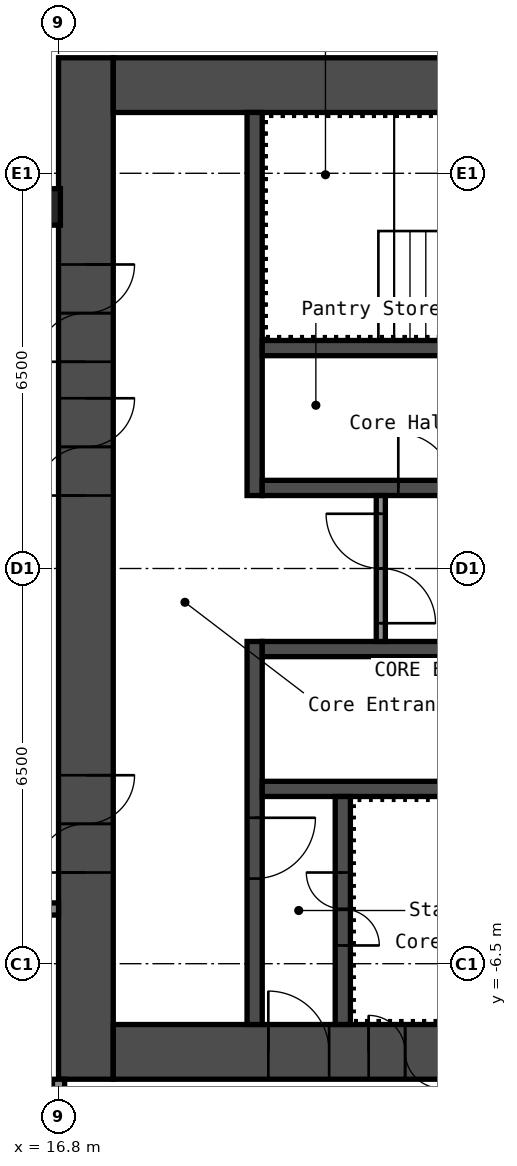
"""IFC4 building model, lengths in metres.
Left out: names, types, materials, properties, quantities, classifications, styles, units other than length and angle.
Written with IfcOpenShell. Run it as: python <this file> out.ifc"""

import sys

from ifc_helpers import new_model, si_unit, direction, frame, frame_2d, origin, origin_2d, place, context, subcontext, project, spatial, rectangle, hollow_rectangle, extrude, element, fill, save


model = new_model("IFC4")
c1 = context("Model", 3, precision=1e-05, world=origin(), true_north=direction((0.0, 1.0)))
c2 = subcontext(c1, "Body", "Model", "MODEL_VIEW")
j1 = project(units=[si_unit("LENGTHUNIT", "METRE"), si_unit("PLANEANGLEUNIT", "RADIAN")], contexts=[c1])
p1 = place(None, origin())
s1 = spatial("IfcSite", under=j1, at=p1, CompositionType="ELEMENT")
p2 = place(p1, origin())
s2 = spatial("IfcBuilding", under=s1, at=p2, CompositionType="ELEMENT")
p3 = place(p2, frame((0.0, 0.0, 264.6)))
s3 = spatial("IfcBuildingStorey", under=s2, at=p3, CompositionType="ELEMENT", Elevation=264.6)
p4 = place(p3, frame((16.53, 5.947, 0.0), z_axis=(0.0, 0.0, 1.0), x_axis=(1.0, 0.0, 0.0)))
e1 = element("IfcColumn", 1, at=p4, inside=s3, PredefinedType="COLUMN", context=c2, shape_type="SweptSolid", body=[
    extrude(hollow_rectangle(XDim=0.6, YDim=0.6, WallThickness=0.025, InnerFilletRadius=0.038, OuterFilletRadius=0.062, at=origin_2d()), origin(), (0.0, 0.0, 1.0), 5.55),
])
p5 = place(p3, frame((17.25, -8.4, 0.0), z_axis=(0.0, 0.0, 1.0), x_axis=(0.0, 1.0, 0.0)))
e2 = element("IfcWall", 2, at=p5, inside=s3, PredefinedType="SHEAR", context=c2, shape_type="SweptSolid", body=[
    extrude(rectangle(XDim=16.8, YDim=0.9, at=frame_2d((8.4, 0.0))), origin(), (0.0, 0.0, 1.0), 5.55),
])
p6 = place(p5, frame((3.4, 0.0, 0.0)))
e3 = element("IfcOpeningElement", 3, at=p6, cuts=e2, PredefinedType="OPENING", context=c2, shape_type="SweptSolid", body=[
    extrude(rectangle(XDim=1.6, YDim=2.1, at=frame_2d((0.8, 1.05))), frame((0.0, 0.46, 0.0), z_axis=(0.0, -1.0, 0.0), x_axis=(1.0, 0.0, 0.0)), (0.0, 0.0, 1.0), 0.92),
])
p7 = place(p5, frame((9.6, 0.0, 0.0)))
e4 = element("IfcOpeningElement", 4, at=p7, cuts=e2, PredefinedType="OPENING", context=c2, shape_type="SweptSolid", body=[
    extrude(rectangle(XDim=1.6, YDim=2.1, at=frame_2d((0.8, 1.05))), frame((0.0, 0.46, 0.0), z_axis=(0.0, -1.0, 0.0), x_axis=(1.0, 0.0, 0.0)), (0.0, 0.0, 1.0), 0.92),
])
p8 = place(p5, frame((11.8, 0.0, 0.0)))
e5 = element("IfcOpeningElement", 5, at=p8, cuts=e2, PredefinedType="OPENING", context=c2, shape_type="SweptSolid", body=[
    extrude(rectangle(XDim=1.6, YDim=2.1, at=frame_2d((0.8, 1.05))), frame((0.0, 0.46, 0.0), z_axis=(0.0, -1.0, 0.0), x_axis=(1.0, 0.0, 0.0)), (0.0, 0.0, 1.0), 0.92),
])
p9 = place(p3, frame((17.7, 7.95, 0.0), z_axis=(0.0, 0.0, 1.0), x_axis=(1.0, 0.0, 0.0)))
e6 = element("IfcWall", 6, at=p9, inside=s3, PredefinedType="SHEAR", context=c2, shape_type="SweptSolid", body=[
    extrude(rectangle(XDim=15.0, YDim=0.9, at=frame_2d((7.5, 0.0))), origin(), (0.0, 0.0, 1.0), 5.55),
])
p10 = place(p9, frame((10.4, 0.0, 0.0)))
e7 = element("IfcOpeningElement", 7, at=p10, cuts=e6, PredefinedType="OPENING", context=c2, shape_type="SweptSolid", body=[
    extrude(rectangle(XDim=1.2, YDim=2.1, at=frame_2d((0.6, 1.05))), frame((0.0, 0.46, 0.0), z_axis=(0.0, -1.0, 0.0), x_axis=(1.0, 0.0, 0.0)), (0.0, 0.0, 1.0), 0.92),
])
p11 = place(p9, frame((13.35, 0.0, 0.0)))
e8 = element("IfcOpeningElement", 8, at=p11, cuts=e6, PredefinedType="OPENING", context=c2, shape_type="SweptSolid", body=[
    extrude(rectangle(XDim=0.9, YDim=2.1, at=frame_2d((0.45, 1.05))), frame((0.0, 0.46, 0.0), z_axis=(0.0, -1.0, 0.0), x_axis=(1.0, 0.0, 0.0)), (0.0, 0.0, 1.0), 0.92),
])
p12 = place(p9, frame((6.75, 0.0, 0.0)))
e9 = element("IfcOpeningElement", 9, at=p12, cuts=e6, PredefinedType="OPENING", context=c2, shape_type="SweptSolid", body=[
    extrude(rectangle(XDim=1.2, YDim=2.1, at=frame_2d((0.6, 1.05))), frame((0.0, 0.46, 0.0), z_axis=(0.0, -1.0, 0.0), x_axis=(1.0, 0.0, 0.0)), (0.0, 0.0, 1.0), 0.92),
])
p13 = place(p3, frame((17.7, -7.95, 0.0), z_axis=(0.0, 0.0, 1.0), x_axis=(1.0, 0.0, 0.0)))
e10 = element("IfcWall", 10, at=p13, inside=s3, PredefinedType="SHEAR", context=c2, shape_type="SweptSolid", body=[
    extrude(rectangle(XDim=15.0, YDim=0.9, at=frame_2d((7.5, 0.0))), origin(), (0.0, 0.0, 1.0), 5.55),
])
p14 = place(p13, frame((2.55, 0.0, 0.0)))
e11 = element("IfcOpeningElement", 11, at=p14, cuts=e10, PredefinedType="OPENING", context=c2, shape_type="SweptSolid", body=[
    extrude(rectangle(XDim=1.0, YDim=2.1, at=frame_2d((0.5, 1.05))), frame((0.0, 0.46, 0.0), z_axis=(0.0, -1.0, 0.0), x_axis=(1.0, 0.0, 0.0)), (0.0, 0.0, 1.0), 0.92),
])
p15 = place(p13, frame((4.2, 0.0, 0.0)))
e12 = element("IfcOpeningElement", 12, at=p15, cuts=e10, PredefinedType="OPENING", context=c2, shape_type="SweptSolid", body=[
    extrude(rectangle(XDim=1.2, YDim=2.1, at=frame_2d((0.6, 1.05))), frame((0.0, 0.46, 0.0), z_axis=(0.0, -1.0, 0.0), x_axis=(1.0, 0.0, 0.0)), (0.0, 0.0, 1.0), 0.92),
])
p16 = place(p3, frame((20.025, 1.2, 0.0), z_axis=(0.0, 0.0, 1.0), x_axis=(0.0, 1.0, 0.0)))
e13 = element("IfcWall", 13, at=p16, inside=s3, PredefinedType="SHEAR", context=c2, shape_type="SweptSolid", body=[
    extrude(rectangle(XDim=6.3, YDim=0.25, at=frame_2d((3.15, 0.0))), origin(), (0.0, 0.0, 1.0), 5.55),
])
p17 = place(p3, frame((20.025, -7.5, 0.0), z_axis=(0.0, 0.0, 1.0), x_axis=(0.0, 1.0, 0.0)))
e14 = element("IfcWall", 14, at=p17, inside=s3, PredefinedType="SHEAR", context=c2, shape_type="SweptSolid", body=[
    extrude(rectangle(XDim=6.3, YDim=0.25, at=frame_2d((3.15, 0.0))), origin(), (0.0, 0.0, 1.0), 5.55),
])
p18 = place(p17, frame((2.4, 0.0, 0.0)))
e15 = element("IfcOpeningElement", 15, at=p18, cuts=e14, PredefinedType="OPENING", context=c2, shape_type="SweptSolid", body=[
    extrude(rectangle(XDim=1.0, YDim=2.1, at=frame_2d((0.5, 1.05))), frame((0.0, 0.135, 0.0), z_axis=(0.0, -1.0, 0.0), x_axis=(1.0, 0.0, 0.0)), (0.0, 0.0, 1.0), 0.27),
])
p19 = place(p3, frame((20.15, 1.325, 0.0), z_axis=(0.0, 0.0, 1.0), x_axis=(1.0, 0.0, 0.0)))
e16 = element("IfcWall", 16, at=p19, inside=s3, PredefinedType="SHEAR", context=c2, shape_type="SweptSolid", body=[
    extrude(rectangle(XDim=7.5, YDim=0.25, at=frame_2d((3.75, 0.0))), origin(), (0.0, 0.0, 1.0), 5.55),
])
p20 = place(p19, frame((2.238, 0.0, 0.0)))
e17 = element("IfcOpeningElement", 17, at=p20, cuts=e16, PredefinedType="OPENING", context=c2, shape_type="SweptSolid", body=[
    extrude(rectangle(XDim=0.9, YDim=2.1, at=frame_2d((0.45, 1.05))), frame((0.0, 0.135, 0.0), z_axis=(0.0, -1.0, 0.0), x_axis=(1.0, 0.0, 0.0)), (0.0, 0.0, 1.0), 0.27),
])
p21 = place(p19, frame((5.938, 0.0, 0.0)))
e18 = element("IfcOpeningElement", 18, at=p21, cuts=e16, PredefinedType="OPENING", context=c2, shape_type="SweptSolid", body=[
    extrude(rectangle(XDim=0.9, YDim=2.1, at=frame_2d((0.45, 1.05))), frame((0.0, 0.135, 0.0), z_axis=(0.0, -1.0, 0.0), x_axis=(1.0, 0.0, 0.0)), (0.0, 0.0, 1.0), 0.27),
])
for number, where, z_axis, x_axis in (
    (19, (20.15, 3.625, 0.0), (0.0, 0.0, 1.0), (1.0, 0.0, 0.0)),
    (20, (20.15, -1.325, 0.0), (0.0, 0.0, 1.0), (1.0, 0.0, 0.0)),
    (21, (20.15, -3.625, 0.0), (0.0, 0.0, 1.0), (1.0, 0.0, 0.0)),
):
    element("IfcWall", number, at=place(p3, frame(where, z_axis=z_axis, x_axis=x_axis)), inside=s3, PredefinedType="SHEAR", context=c2, shape_type="SweptSolid", body=[
        extrude(rectangle(XDim=7.5, YDim=0.25, at=frame_2d((3.75, 0.0))), origin(), (0.0, 0.0, 1.0), 5.55),
    ])
p22 = place(p3, frame((21.475, -7.5, 0.0), z_axis=(0.0, 0.0, 1.0), x_axis=(0.0, 1.0, 0.0)))
e22 = element("IfcWall", 22, at=p22, inside=s3, PredefinedType="SHEAR", context=c2, shape_type="SweptSolid", body=[
    extrude(rectangle(XDim=3.75, YDim=0.25, at=frame_2d((1.875, 0.0))), origin(), (0.0, 0.0, 1.0), 5.55),
])
p23 = place(p22, frame((1.3, 0.0, 0.0)))
e23 = element("IfcOpeningElement", 23, at=p23, cuts=e22, PredefinedType="OPENING", context=c2, shape_type="SweptSolid", body=[
    extrude(rectangle(XDim=1.2, YDim=2.1, at=frame_2d((0.6, 1.05))), frame((0.0, 0.135, 0.0), z_axis=(0.0, -1.0, 0.0), x_axis=(1.0, 0.0, 0.0)), (0.0, 0.0, 1.0), 0.27),
])
p24 = place(p3, frame((22.1, -1.2, 0.0), z_axis=(0.0, 0.0, 1.0), x_axis=(0.0, 1.0, 0.0)))
e24 = element("IfcWall", 24, at=p24, inside=s3, PredefinedType="PARTITIONING", context=c2, shape_type="SweptSolid", body=[
    extrude(rectangle(XDim=2.4, YDim=0.15, at=frame_2d((1.2, 0.0))), origin(), (0.0, 0.0, 1.0), 5.55),
])
p25 = place(p24, frame((0.3, 0.0, 0.0)))
e25 = element("IfcOpeningElement", 25, at=p25, cuts=e24, PredefinedType="OPENING", context=c2, shape_type="SweptSolid", body=[
    extrude(rectangle(XDim=1.8, YDim=2.1, at=frame_2d((0.9, 1.05))), frame((0.0, 0.085, 0.0), z_axis=(0.0, -1.0, 0.0), x_axis=(1.0, 0.0, 0.0)), (0.0, 0.0, 1.0), 0.17),
])
p26 = place(p3, frame((2.3, -5.6, 0.0), z_axis=(0.0, 0.0, 1.0), x_axis=(1.0, 0.0, 0.0)))
e26 = element("IfcWall", 26, at=p26, inside=s3, PredefinedType="PARTITIONING", context=c2, shape_type="SweptSolid", body=[
    extrude(rectangle(XDim=14.5, YDim=0.2, at=frame_2d((7.25, 0.0))), origin(), (0.0, 0.0, 1.0), 5.55),
])
p27 = place(p26, frame((1.1, 0.0, 0.0)))
e27 = element("IfcOpeningElement", 27, at=p27, cuts=e26, PredefinedType="OPENING", context=c2, shape_type="SweptSolid", body=[
    extrude(rectangle(XDim=1.0, YDim=2.1, at=frame_2d((0.5, 1.05))), frame((0.0, 0.11, 0.0), z_axis=(0.0, -1.0, 0.0), x_axis=(1.0, 0.0, 0.0)), (0.0, 0.0, 1.0), 0.22),
])
p28 = place(p26, frame((5.25, 0.0, 0.0)))
e28 = element("IfcOpeningElement", 28, at=p28, cuts=e26, PredefinedType="OPENING", context=c2, shape_type="SweptSolid", body=[
    extrude(rectangle(XDim=0.9, YDim=2.1, at=frame_2d((0.45, 1.05))), frame((0.0, 0.11, 0.0), z_axis=(0.0, -1.0, 0.0), x_axis=(1.0, 0.0, 0.0)), (0.0, 0.0, 1.0), 0.22),
])
p29 = place(p3, frame((16.8, -10.8, 0.0), z_axis=(0.0, 0.0, 1.0), x_axis=(0.0, 1.0, 0.0)))
e29 = element("IfcWall", 29, at=p29, inside=s3, PredefinedType="PARTITIONING", context=c2, shape_type="SweptSolid", body=[
    extrude(rectangle(XDim=2.4, YDim=0.2, at=frame_2d((1.2, 0.0))), origin(), (0.0, 0.0, 1.0), 5.55),
])
p30 = place(p6, origin())
e30 = element("IfcDoor", 30, at=p30, inside=s3, OperationType="DOUBLE_DOOR_SINGLE_SWING", PredefinedType="DOOR", context=c2, shape_type="SweptSolid", body=[
    extrude(rectangle(XDim=1.6, YDim=2.1, at=frame_2d((0.8, 1.05))), frame((0.0, 0.025, 0.0), z_axis=(0.0, -1.0, 0.0), x_axis=(1.0, 0.0, 0.0)), (0.0, 0.0, 1.0), 0.05),
])
fill(e3, e30)
p31 = place(p7, origin())
e31 = element("IfcDoor", 31, at=p31, inside=s3, OperationType="DOUBLE_DOOR_SINGLE_SWING", PredefinedType="DOOR", context=c2, shape_type="SweptSolid", body=[
    extrude(rectangle(XDim=1.6, YDim=2.1, at=frame_2d((0.8, 1.05))), frame((0.0, 0.025, 0.0), z_axis=(0.0, -1.0, 0.0), x_axis=(1.0, 0.0, 0.0)), (0.0, 0.0, 1.0), 0.05),
])
fill(e4, e31)
p32 = place(p8, origin())
e32 = element("IfcDoor", 32, at=p32, inside=s3, OperationType="DOUBLE_DOOR_SINGLE_SWING", PredefinedType="DOOR", context=c2, shape_type="SweptSolid", body=[
    extrude(rectangle(XDim=1.6, YDim=2.1, at=frame_2d((0.8, 1.05))), frame((0.0, 0.025, 0.0), z_axis=(0.0, -1.0, 0.0), x_axis=(1.0, 0.0, 0.0)), (0.0, 0.0, 1.0), 0.05),
])
fill(e5, e32)
p33 = place(p14, origin())
e33 = element("IfcDoor", 33, at=p33, inside=s3, OperationType="SINGLE_SWING_RIGHT", PredefinedType="DOOR", context=c2, shape_type="SweptSolid", body=[
    extrude(rectangle(XDim=1.0, YDim=2.1, at=frame_2d((0.5, 1.05))), frame((0.0, 0.025, 0.0), z_axis=(0.0, -1.0, 0.0), x_axis=(1.0, 0.0, 0.0)), (0.0, 0.0, 1.0), 0.05),
])
fill(e11, e33)
p34 = place(p15, origin())
e34 = element("IfcDoor", 34, at=p34, inside=s3, OperationType="DOUBLE_DOOR_SINGLE_SWING", PredefinedType="DOOR", context=c2, shape_type="SweptSolid", body=[
    extrude(rectangle(XDim=1.2, YDim=2.1, at=frame_2d((0.6, 1.05))), frame((0.0, 0.025, 0.0), z_axis=(0.0, -1.0, 0.0), x_axis=(1.0, 0.0, 0.0)), (0.0, 0.0, 1.0), 0.05),
])
fill(e12, e34)
p35 = place(p23, origin())
e35 = element("IfcDoor", 35, at=p35, inside=s3, OperationType="DOUBLE_DOOR_SINGLE_SWING", PredefinedType="DOOR", context=c2, shape_type="SweptSolid", body=[
    extrude(rectangle(XDim=1.2, YDim=2.1, at=frame_2d((0.6, 1.05))), frame((0.0, 0.025, 0.0), z_axis=(0.0, -1.0, 0.0), x_axis=(1.0, 0.0, 0.0)), (0.0, 0.0, 1.0), 0.05),
])
fill(e23, e35)
p36 = place(p18, origin())
e36 = element("IfcDoor", 36, at=p36, inside=s3, OperationType="SINGLE_SWING_RIGHT", PredefinedType="DOOR", context=c2, shape_type="SweptSolid", body=[
    extrude(rectangle(XDim=1.0, YDim=2.1, at=frame_2d((0.5, 1.05))), frame((0.0, 0.025, 0.0), z_axis=(0.0, -1.0, 0.0), x_axis=(1.0, 0.0, 0.0)), (0.0, 0.0, 1.0), 0.05),
])
fill(e15, e36)
p37 = place(p25, origin())
e37 = element("IfcDoor", 37, at=p37, inside=s3, OperationType="DOUBLE_DOOR_SINGLE_SWING", PredefinedType="DOOR", context=c2, shape_type="SweptSolid", body=[
    extrude(rectangle(XDim=1.8, YDim=2.1, at=frame_2d((0.9, 1.05))), frame((0.0, 0.025, 0.0), z_axis=(0.0, -1.0, 0.0), x_axis=(1.0, 0.0, 0.0)), (0.0, 0.0, 1.0), 0.05),
])
fill(e25, e37)
p38 = place(p20, origin())
e38 = element("IfcDoor", 38, at=p38, inside=s3, OperationType="SINGLE_SWING_RIGHT", PredefinedType="DOOR", context=c2, shape_type="SweptSolid", body=[
    extrude(rectangle(XDim=0.9, YDim=2.1, at=frame_2d((0.45, 1.05))), frame((0.0, 0.025, 0.0), z_axis=(0.0, -1.0, 0.0), x_axis=(1.0, 0.0, 0.0)), (0.0, 0.0, 1.0), 0.05),
])
fill(e17, e38)
save(model, sys.argv[1])
